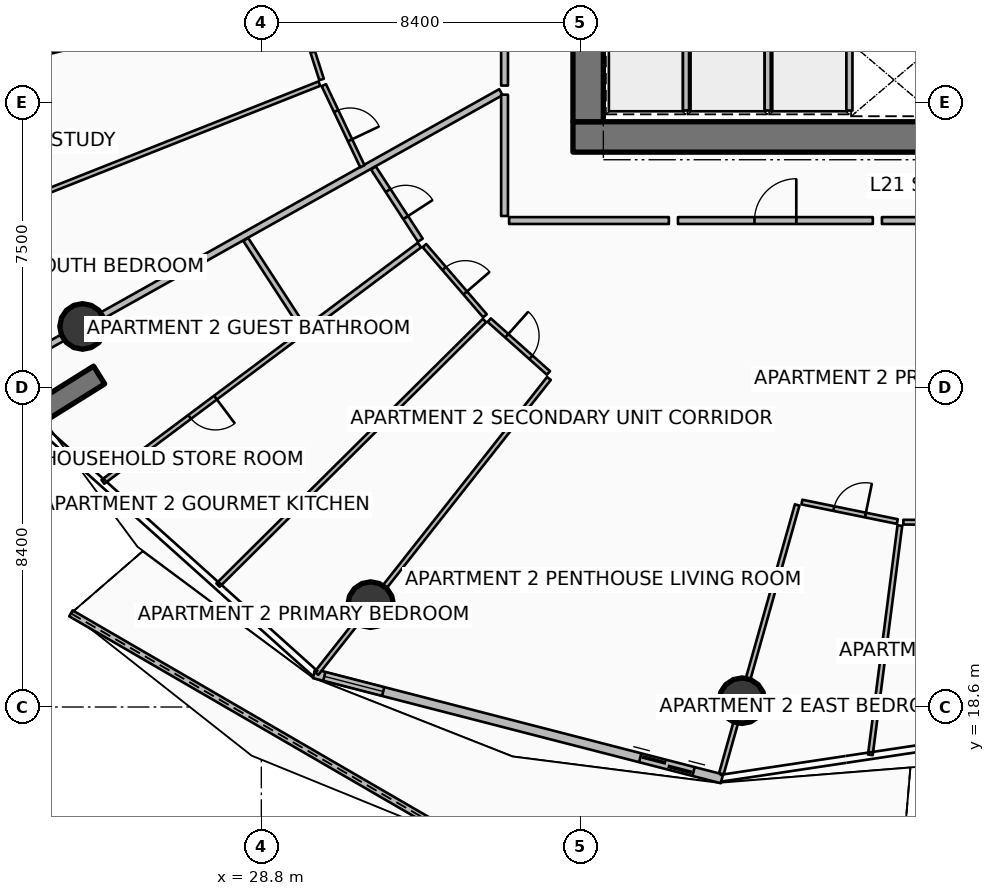
"""IFC4 building model, lengths in metres.
Left out: names, types, materials, properties, quantities, classifications, styles, units other than length and angle.
Written with IfcOpenShell. Run it as: python <this file> out.ifc"""

import sys

from ifc_helpers import new_model, si_unit, direction, frame, frame_2d, origin, origin_2d, place, context, subcontext, project, spatial, polyline, rectangle, circle, outline, extrude, element, fill, save


model = new_model("IFC4")
c1 = context("Model", 3, precision=1e-05, world=origin(), true_north=direction((0.0, 1.0)))
c2 = subcontext(c1, "Body", "Model", "MODEL_VIEW")
j1 = project(units=[si_unit("LENGTHUNIT", "METRE"), si_unit("PLANEANGLEUNIT", "RADIAN")], contexts=[c1])
p1 = place(None, origin())
s1 = spatial("IfcSite", under=j1, at=p1, CompositionType="ELEMENT")
p2 = place(p1, origin())
s2 = spatial("IfcBuilding", under=s1, at=p2, CompositionType="ELEMENT")
p3 = place(p2, frame((0.0, 0.0, 86.4)))
s3 = spatial("IfcBuildingStorey", under=s2, at=p3, CompositionType="ELEMENT", Elevation=86.4)
p4 = place(p3, frame((37.0, 33.6, 0.0), z_axis=(0.0, 0.0, 1.0), x_axis=(1.0, 0.0, 0.0)))
e1 = element("IfcWall", 1, at=p4, inside=s3, PredefinedType="SHEAR", context=c2, shape_type="SweptSolid", body=[
    extrude(rectangle(XDim=9.9, YDim=0.8, at=frame_2d((4.95, 0.0))), origin(), (0.0, 0.0, 1.0), 3.75),
])
p5 = place(p3, frame((37.4, 34.0, 0.0), z_axis=(0.0, 0.0, 1.0), x_axis=(0.0, 1.0, 0.0)))
e2 = element("IfcWall", 2, at=p5, inside=s3, PredefinedType="SHEAR", context=c2, shape_type="SweptSolid", body=[
    extrude(rectangle(XDim=16.0, YDim=0.8, at=frame_2d((8.0, 0.0))), origin(), (0.0, 0.0, 1.0), 3.75),
])
p6 = place(p3, frame((24.531, 27.335, 0.0), z_axis=(0.0, 0.0, 1.0), x_axis=(-0.848053161125, -0.529911158502, 0.0)))
e3 = element("IfcWall", 3, at=p6, inside=s3, PredefinedType="SOLIDWALL", context=c2, shape_type="SweptSolid", body=[
    extrude(rectangle(XDim=3.5, YDim=0.55, at=frame_2d((1.75, 0.0))), origin(), (0.0, 0.0, 1.0), 3.75),
])
for number, where, z_axis, x_axis in (
    (4, (24.097, 28.614, 0.0), (0.0, 0.0, 1.0), (1.0, 0.0, 0.0)),
    (5, (31.677, 21.294, 0.0), (0.0, 0.0, 1.0), (1.0, 0.0, 0.0)),
    (6, (41.447, 18.766, 0.0), (0.0, 0.0, 1.0), (1.0, 0.0, 0.0)),
):
    element("IfcColumn", number, at=place(p3, frame(where, z_axis=z_axis, x_axis=x_axis)), inside=s3, PredefinedType="COLUMN", context=c2, shape_type="SweptSolid", body=[
        extrude(circle(Radius=0.6, at=origin_2d()), origin(), (0.0, 0.0, 1.0), 3.5),
    ])
p7 = place(p3, frame((23.789, 21.065, 0.0), z_axis=(0.0, 0.0, 1.0), x_axis=(0.864945812977, -0.501865261413, 0.0)))
e7 = element("IfcWall", 7, at=p7, inside=s3, PredefinedType="PARAPET", context=c2, shape_type="SweptSolid", body=[
    extrude(outline(polyline([(0.0, 0.0), (11.966, 0.0), (11.966, 1.832), (5.983, 1.853), (0.0, 1.756), (0.0, 0.0)])), frame((0.0, 0.09, 0.0), z_axis=(0.0, -1.0, 0.0), x_axis=(1.0, 0.0, 0.0)), (0.0, 0.0, 1.0), 0.18),
])
p8 = place(p3, frame((30.186, 19.477, 0.0), z_axis=(0.0, 0.0, 1.0), x_axis=(0.968356180858, -0.249572248045, 0.0)))
e8 = element("IfcWall", 8, at=p8, inside=s3, PredefinedType="SOLIDWALL", context=c2, shape_type="SweptSolid", body=[
    extrude(rectangle(XDim=11.084, YDim=0.24, at=frame_2d((5.542, 0.0))), origin(), (0.0, 0.0, 1.0), 2.45),
])
p9 = place(p8, frame((8.865, 0.0, 0.0)))
e9 = element("IfcOpeningElement", 9, at=p9, cuts=e8, PredefinedType="OPENING", context=c2, shape_type="SweptSolid", body=[
    extrude(rectangle(XDim=1.45, YDim=2.15, at=frame_2d((0.725, 1.075))), frame((0.0, 0.13, 0.0), z_axis=(0.0, -1.0, 0.0), x_axis=(1.0, 0.0, 0.0)), (0.0, 0.0, 1.0), 0.26),
])
p10 = place(p8, frame((0.28, 0.0, 0.65)))
e10 = element("IfcOpeningElement", 10, at=p10, cuts=e8, PredefinedType="OPENING", context=c2, shape_type="SweptSolid", body=[
    extrude(rectangle(XDim=1.6, YDim=1.5, at=frame_2d((0.8, 0.75))), frame((0.0, 0.13, 0.0), z_axis=(0.0, -1.0, 0.0), x_axis=(1.0, 0.0, 0.0)), (0.0, 0.0, 1.0), 0.26),
])
for number, where, z_axis, x_axis in (
    (11, (39.975, 34.295, 0.0), (0.0, 0.0, 1.0), (0.0, 1.0, 0.0)),
    (12, (42.125, 34.295, 0.0), (0.0, 0.0, 1.0), (0.0, 1.0, 0.0)),
    (13, (44.275, 34.295, 0.0), (0.0, 0.0, 1.0), (0.0, 1.0, 0.0)),
):
    element("IfcWall", number, at=place(p3, frame(where, z_axis=z_axis, x_axis=x_axis)), inside=s3, PredefinedType="PARTITIONING", context=c2, shape_type="SweptSolid", body=[
        extrude(rectangle(XDim=1.61, YDim=0.16, at=frame_2d((0.805, 0.0))), origin(), (0.0, 0.0, 1.0), 3.5),
    ])
p11 = place(p3, frame((35.104, 34.778, 0.0), z_axis=(0.0, 0.0, 1.0), x_axis=(-0.872490437896, -0.488631185845, 0.0)))
e14 = element("IfcWall", 14, at=p11, inside=s3, PredefinedType="PARTITIONING", context=c2, shape_type="SweptSolid", body=[
    extrude(rectangle(XDim=14.699, YDim=0.18, at=frame_2d((7.35, 0.0))), origin(), (0.0, 0.0, 1.0), 2.94),
])
p12 = place(p3, frame((35.2, 40.365, 0.0), z_axis=(0.0, 0.0, 1.0), x_axis=(0.0, -1.0, 0.0)))
e15 = element("IfcWall", 15, at=p12, inside=s3, PredefinedType="PARTITIONING", context=c2, shape_type="SweptSolid", body=[
    extrude(rectangle(XDim=5.413, YDim=0.18, at=frame_2d((2.707, 0.0))), origin(), (0.0, 0.0, 1.0), 2.94),
])
p13 = place(p3, frame((29.552, 37.417, 0.0), z_axis=(0.0, 0.0, 1.0), x_axis=(-0.970504192203, -0.241084244437, 0.0)))
e16 = element("IfcWall", 16, at=p13, inside=s3, PredefinedType="PARTITIONING", context=c2, shape_type="SweptSolid", body=[
    extrude(rectangle(XDim=9.976, YDim=0.125, at=frame_2d((4.988, 0.0))), origin(), (0.0, 0.0, 1.0), 2.94),
])
p14 = place(p3, frame((30.326, 35.002, 0.0), z_axis=(0.0, 0.0, 1.0), x_axis=(-0.929777602375, -0.368121732748, 0.0)))
e17 = element("IfcWall", 17, at=p14, inside=s3, PredefinedType="PARTITIONING", context=c2, shape_type="SweptSolid", body=[
    extrude(rectangle(XDim=9.961, YDim=0.125, at=frame_2d((4.98, 0.0))), origin(), (0.0, 0.0, 1.0), 2.94),
])
p15 = place(p3, frame((29.663, 37.363, 0.0), z_axis=(0.0, 0.0, 1.0), x_axis=(0.305393983716, -0.952226083822, 0.0)))
e18 = element("IfcWall", 18, at=p15, inside=s3, PredefinedType="PARTITIONING", context=c2, shape_type="SweptSolid", body=[
    extrude(rectangle(XDim=2.364, YDim=0.125, at=frame_2d((1.182, 0.0))), origin(), (0.0, 0.0, 1.0), 2.94),
])
p16 = place(p15, frame((0.757, 0.0, 0.0)))
e19 = element("IfcOpeningElement", 19, at=p16, cuts=e18, PredefinedType="OPENING", context=c2, shape_type="SweptSolid", body=[
    extrude(rectangle(XDim=0.85, YDim=2.06, at=frame_2d((0.425, 1.03))), frame((0.0, 0.073, 0.0), z_axis=(0.0, -1.0, 0.0), x_axis=(1.0, 0.0, 0.0)), (0.0, 0.0, 1.0), 0.145),
])
p17 = place(p3, frame((30.444, 34.963, 0.0), z_axis=(0.0, 0.0, 1.0), x_axis=(0.429404357622, -0.903112339443, 0.0)))
e20 = element("IfcWall", 20, at=p17, inside=s3, PredefinedType="PARTITIONING", context=c2, shape_type="SweptSolid", body=[
    extrude(rectangle(XDim=2.364, YDim=0.125, at=frame_2d((1.182, 0.0))), origin(), (0.0, 0.0, 1.0), 2.94),
])
p18 = place(p17, frame((0.757, 0.0, 0.0)))
e21 = element("IfcOpeningElement", 21, at=p18, cuts=e20, PredefinedType="OPENING", context=c2, shape_type="SweptSolid", body=[
    extrude(rectangle(XDim=0.85, YDim=2.06, at=frame_2d((0.425, 1.03))), frame((0.0, 0.073, 0.0), z_axis=(0.0, -1.0, 0.0), x_axis=(1.0, 0.0, 0.0)), (0.0, 0.0, 1.0), 0.145),
])
p19 = place(p3, frame((39.764, 31.4, 0.0), z_axis=(0.0, 0.0, 1.0), x_axis=(1.0, 0.0, 0.0)))
e22 = element("IfcWall", 22, at=p19, inside=s3, PredefinedType="PARTITIONING", context=c2, shape_type="SweptSolid", body=[
    extrude(rectangle(XDim=5.127, YDim=0.18, at=frame_2d((2.563, 0.0))), origin(), (0.0, 0.0, 1.0), 2.94),
])
p20 = place(p19, frame((2.013, 0.0, 0.0)))
e23 = element("IfcOpeningElement", 23, at=p20, cuts=e22, PredefinedType="OPENING", context=c2, shape_type="SweptSolid", body=[
    extrude(rectangle(XDim=1.1, YDim=2.1, at=frame_2d((0.55, 1.05))), frame((0.0, 0.1, 0.0), z_axis=(0.0, -1.0, 0.0), x_axis=(1.0, 0.0, 0.0)), (0.0, 0.0, 1.0), 0.2),
])
p21 = place(p3, frame((35.2, 34.712, 0.0), z_axis=(0.0, 0.0, 1.0), x_axis=(0.0, -1.0, 0.0)))
e24 = element("IfcWall", 24, at=p21, inside=s3, PredefinedType="PARTITIONING", context=c2, shape_type="SweptSolid", body=[
    extrude(rectangle(XDim=3.192, YDim=0.18, at=frame_2d((1.596, 0.0))), origin(), (0.0, 0.0, 1.0), 2.94),
])
p22 = place(p3, frame((35.32, 31.4, 0.0), z_axis=(0.0, 0.0, 1.0), x_axis=(1.0, 0.0, 0.0)))
e25 = element("IfcWall", 25, at=p22, inside=s3, PredefinedType="PARTITIONING", context=c2, shape_type="SweptSolid", body=[
    extrude(rectangle(XDim=4.204, YDim=0.18, at=frame_2d((2.102, 0.0))), origin(), (0.0, 0.0, 1.0), 2.94),
])
p23 = place(p3, frame((36.368, 27.245, 0.0), z_axis=(0.0, 0.0, 1.0), x_axis=(-0.619096231027, -0.785315132115, 0.0)))
e26 = element("IfcWall", 26, at=p23, inside=s3, PredefinedType="PARTITIONING", context=c2, shape_type="SweptSolid", body=[
    extrude(rectangle(XDim=9.882, YDim=0.125, at=frame_2d((4.941, 0.0))), origin(), (0.0, 0.0, 1.0), 2.94),
])
p24 = place(p3, frame((31.748, 32.784, 0.0), z_axis=(0.0, 0.0, 1.0), x_axis=(0.544920213423, -0.838487901524, 0.0)))
e27 = element("IfcWall", 27, at=p24, inside=s3, PredefinedType="PARTITIONING", context=c2, shape_type="SweptSolid", body=[
    extrude(rectangle(XDim=2.267, YDim=0.15, at=frame_2d((1.134, 0.0))), origin(), (0.0, 0.0, 1.0), 2.94),
])
p25 = place(p24, frame((0.708, 0.0, 0.0)))
e28 = element("IfcOpeningElement", 28, at=p25, cuts=e27, PredefinedType="OPENING", context=c2, shape_type="SweptSolid", body=[
    extrude(rectangle(XDim=0.85, YDim=2.06, at=frame_2d((0.425, 1.03))), frame((0.0, 0.085, 0.0), z_axis=(0.0, -1.0, 0.0), x_axis=(1.0, 0.0, 0.0)), (0.0, 0.0, 1.0), 0.17),
])
p26 = place(p3, frame((28.389, 30.903, 0.0), z_axis=(0.0, 0.0, 1.0), x_axis=(0.544849096032, -0.838534115318, 0.0)))
e29 = element("IfcWall", 29, at=p26, inside=s3, PredefinedType="PARTITIONING", context=c2, shape_type="SweptSolid", body=[
    extrude(rectangle(XDim=2.773, YDim=0.15, at=frame_2d((1.387, 0.0))), origin(), (0.0, 0.0, 1.0), 2.94),
])
p27 = place(p3, frame((32.961, 30.754, 0.0), z_axis=(0.0, 0.0, 1.0), x_axis=(-0.800889069655, -0.598812740435, 0.0)))
e30 = element("IfcWall", 30, at=p27, inside=s3, PredefinedType="PARTITIONING", context=c2, shape_type="SweptSolid", body=[
    extrude(rectangle(XDim=3.72, YDim=0.15, at=frame_2d((1.86, 0.0))), origin(), (0.0, 0.0, 1.0), 2.94),
])
p28 = place(p3, frame((29.877, 28.448, 0.0), z_axis=(0.0, 0.0, 1.0), x_axis=(-0.800862229892, -0.598848635911, 0.0)))
e31 = element("IfcWall", 31, at=p28, inside=s3, PredefinedType="PARTITIONING", context=c2, shape_type="SweptSolid", body=[
    extrude(rectangle(XDim=6.552, YDim=0.125, at=frame_2d((3.276, 0.0))), origin(), (0.0, 0.0, 1.0), 2.94),
])
p29 = place(p28, frame((2.851, 0.0, 0.0)))
e32 = element("IfcOpeningElement", 32, at=p29, cuts=e31, PredefinedType="OPENING", context=c2, shape_type="SweptSolid", body=[
    extrude(rectangle(XDim=0.85, YDim=2.06, at=frame_2d((0.425, 1.03))), frame((0.0, 0.073, 0.0), z_axis=(0.0, -1.0, 0.0), x_axis=(1.0, 0.0, 0.0)), (0.0, 0.0, 1.0), 0.145),
])
p30 = place(p3, frame((34.673, 28.769, 0.0), z_axis=(0.0, 0.0, 1.0), x_axis=(-0.709671596246, -0.70453262911, 0.0)))
e33 = element("IfcWall", 33, at=p30, inside=s3, PredefinedType="PARTITIONING", context=c2, shape_type="SweptSolid", body=[
    extrude(rectangle(XDim=9.882, YDim=0.125, at=frame_2d((4.941, 0.0))), origin(), (0.0, 0.0, 1.0), 2.94),
])
p31 = place(p3, frame((33.092, 30.74, 0.0), z_axis=(0.0, 0.0, 1.0), x_axis=(0.653244508484, -0.757147021479, 0.0)))
e34 = element("IfcWall", 34, at=p31, inside=s3, PredefinedType="PARTITIONING", context=c2, shape_type="SweptSolid", body=[
    extrude(rectangle(XDim=2.439, YDim=0.125, at=frame_2d((1.219, 0.0))), origin(), (0.0, 0.0, 1.0), 2.94),
])
p32 = place(p31, frame((0.794, 0.0, 0.0)))
e35 = element("IfcOpeningElement", 35, at=p32, cuts=e34, PredefinedType="OPENING", context=c2, shape_type="SweptSolid", body=[
    extrude(rectangle(XDim=0.85, YDim=2.06, at=frame_2d((0.425, 1.03))), frame((0.0, 0.073, 0.0), z_axis=(0.0, -1.0, 0.0), x_axis=(1.0, 0.0, 0.0)), (0.0, 0.0, 1.0), 0.145),
])
p33 = place(p3, frame((34.797, 28.78, 0.0), z_axis=(0.0, 0.0, 1.0), x_axis=(0.74635037564, -0.665553241132, 0.0)))
e36 = element("IfcWall", 36, at=p33, inside=s3, PredefinedType="PARTITIONING", context=c2, shape_type="SweptSolid", body=[
    extrude(rectangle(XDim=2.088, YDim=0.125, at=frame_2d((1.044, 0.0))), origin(), (0.0, 0.0, 1.0), 2.94),
])
p34 = place(p33, frame((0.619, 0.0, 0.0)))
e37 = element("IfcOpeningElement", 37, at=p34, cuts=e36, PredefinedType="OPENING", context=c2, shape_type="SweptSolid", body=[
    extrude(rectangle(XDim=0.85, YDim=2.06, at=frame_2d((0.425, 1.03))), frame((0.0, 0.073, 0.0), z_axis=(0.0, -1.0, 0.0), x_axis=(1.0, 0.0, 0.0)), (0.0, 0.0, 1.0), 0.145),
])
p35 = place(p3, frame((45.131, 31.4, 0.0), z_axis=(0.0, 0.0, 1.0), x_axis=(1.0, 0.0, 0.0)))
e38 = element("IfcWall", 38, at=p35, inside=s3, PredefinedType="PARTITIONING", context=c2, shape_type="SweptSolid", body=[
    extrude(rectangle(XDim=4.004, YDim=0.18, at=frame_2d((2.002, 0.0))), origin(), (0.0, 0.0, 1.0), 2.94),
])
p36 = place(p3, frame((42.9, 23.917, 0.0), z_axis=(0.0, 0.0, 1.0), x_axis=(-0.27145069635, -0.962452346587, 0.0)))
e39 = element("IfcWall", 39, at=p36, inside=s3, PredefinedType="PARTITIONING", context=c2, shape_type="SweptSolid", body=[
    extrude(rectangle(XDim=7.349, YDim=0.125, at=frame_2d((3.674, 0.0))), origin(), (0.0, 0.0, 1.0), 2.94),
])
p37 = place(p3, frame((45.603, 23.375, 0.0), z_axis=(0.0, 0.0, 1.0), x_axis=(-0.127689849516, -0.991814147071, 0.0)))
e40 = element("IfcWall", 40, at=p37, inside=s3, PredefinedType="PARTITIONING", context=c2, shape_type="SweptSolid", body=[
    extrude(rectangle(XDim=6.082, YDim=0.125, at=frame_2d((3.041, 0.0))), origin(), (0.0, 0.0, 1.0), 2.94),
])
p38 = place(p3, frame((43.025, 23.993, 0.0), z_axis=(0.0, 0.0, 1.0), x_axis=(0.97978119615, -0.200072006215, 0.0)))
e41 = element("IfcWall", 41, at=p38, inside=s3, PredefinedType="PARTITIONING", context=c2, shape_type="SweptSolid", body=[
    extrude(rectangle(XDim=2.562, YDim=0.125, at=frame_2d((1.281, 0.0))), origin(), (0.0, 0.0, 1.0), 2.94),
])
p39 = place(p38, frame((0.856, 0.0, 0.0)))
e42 = element("IfcOpeningElement", 42, at=p39, cuts=e41, PredefinedType="OPENING", context=c2, shape_type="SweptSolid", body=[
    extrude(rectangle(XDim=0.85, YDim=2.06, at=frame_2d((0.425, 1.03))), frame((0.0, 0.073, 0.0), z_axis=(0.0, -1.0, 0.0), x_axis=(1.0, 0.0, 0.0)), (0.0, 0.0, 1.0), 0.145),
])
p40 = place(p3, frame((45.694, 23.463, 0.0), z_axis=(0.0, 0.0, 1.0), x_axis=(0.999986986287, -0.005101691496, 0.0)))
e43 = element("IfcWall", 43, at=p40, inside=s3, PredefinedType="PARTITIONING", context=c2, shape_type="SweptSolid", body=[
    extrude(rectangle(XDim=4.403, YDim=0.125, at=frame_2d((2.201, 0.0))), origin(), (0.0, 0.0, 1.0), 2.94),
])
p41 = place(p40, frame((1.751, 0.0, 0.0)))
e44 = element("IfcOpeningElement", 44, at=p41, cuts=e43, PredefinedType="OPENING", context=c2, shape_type="SweptSolid", body=[
    extrude(rectangle(XDim=0.9, YDim=2.08, at=frame_2d((0.45, 1.04))), frame((0.0, 0.073, 0.0), z_axis=(0.0, -1.0, 0.0), x_axis=(1.0, 0.0, 0.0)), (0.0, 0.0, 1.0), 0.145),
])
p42 = place(p9, origin())
e45 = element("IfcDoor", 45, at=p42, inside=s3, OperationType="DOUBLE_DOOR_SLIDING", PredefinedType="DOOR", context=c2, shape_type="SweptSolid", body=[
    extrude(rectangle(XDim=1.45, YDim=2.15, at=frame_2d((0.725, 1.075))), frame((0.0, 0.025, 0.0), z_axis=(0.0, -1.0, 0.0), x_axis=(1.0, 0.0, 0.0)), (0.0, 0.0, 1.0), 0.05),
])
fill(e9, e45)
p43 = place(p10, origin())
e46 = element("IfcWindow", 46, at=p43, inside=s3, PartitioningType="SINGLE_PANEL", PredefinedType="WINDOW", context=c2, shape_type="SweptSolid", body=[
    extrude(rectangle(XDim=1.6, YDim=1.5, at=frame_2d((0.8, 0.75))), frame((0.0, 0.03, 0.0), z_axis=(0.0, -1.0, 0.0), x_axis=(1.0, 0.0, 0.0)), (0.0, 0.0, 1.0), 0.06),
])
fill(e10, e46)
p44 = place(p16, origin())
e47 = element("IfcDoor", 47, at=p44, inside=s3, OperationType="SINGLE_SWING_LEFT", PredefinedType="DOOR", context=c2, shape_type="SweptSolid", body=[
    extrude(rectangle(XDim=0.85, YDim=2.06, at=frame_2d((0.425, 1.03))), frame((0.0, 0.025, 0.0), z_axis=(0.0, -1.0, 0.0), x_axis=(1.0, 0.0, 0.0)), (0.0, 0.0, 1.0), 0.05),
])
fill(e19, e47)
p45 = place(p18, origin())
e48 = element("IfcDoor", 48, at=p45, inside=s3, OperationType="SINGLE_SWING_RIGHT", PredefinedType="DOOR", context=c2, shape_type="SweptSolid", body=[
    extrude(rectangle(XDim=0.85, YDim=2.06, at=frame_2d((0.425, 1.03))), frame((0.0, 0.025, 0.0), z_axis=(0.0, -1.0, 0.0), x_axis=(1.0, 0.0, 0.0)), (0.0, 0.0, 1.0), 0.05),
])
fill(e21, e48)
p46 = place(p20, origin())
e49 = element("IfcDoor", 49, at=p46, inside=s3, OperationType="SINGLE_SWING_RIGHT", PredefinedType="DOOR", context=c2, shape_type="SweptSolid", body=[
    extrude(rectangle(XDim=1.1, YDim=2.1, at=frame_2d((0.55, 1.05))), frame((0.0, 0.025, 0.0), z_axis=(0.0, -1.0, 0.0), x_axis=(1.0, 0.0, 0.0)), (0.0, 0.0, 1.0), 0.05),
])
fill(e23, e49)
p47 = place(p25, origin())
e50 = element("IfcDoor", 50, at=p47, inside=s3, OperationType="SINGLE_SWING_RIGHT", PredefinedType="DOOR", context=c2, shape_type="SweptSolid", body=[
    extrude(rectangle(XDim=0.85, YDim=2.06, at=frame_2d((0.425, 1.03))), frame((0.0, 0.025, 0.0), z_axis=(0.0, -1.0, 0.0), x_axis=(1.0, 0.0, 0.0)), (0.0, 0.0, 1.0), 0.05),
])
fill(e28, e50)
p48 = place(p29, origin())
e51 = element("IfcDoor", 51, at=p48, inside=s3, OperationType="SINGLE_SWING_LEFT", PredefinedType="DOOR", context=c2, shape_type="SweptSolid", body=[
    extrude(rectangle(XDim=0.85, YDim=2.06, at=frame_2d((0.425, 1.03))), frame((0.0, 0.025, 0.0), z_axis=(0.0, -1.0, 0.0), x_axis=(1.0, 0.0, 0.0)), (0.0, 0.0, 1.0), 0.05),
])
fill(e32, e51)
p49 = place(p32, origin())
e52 = element("IfcDoor", 52, at=p49, inside=s3, OperationType="SINGLE_SWING_RIGHT", PredefinedType="DOOR", context=c2, shape_type="SweptSolid", body=[
    extrude(rectangle(XDim=0.85, YDim=2.06, at=frame_2d((0.425, 1.03))), frame((0.0, 0.025, 0.0), z_axis=(0.0, -1.0, 0.0), x_axis=(1.0, 0.0, 0.0)), (0.0, 0.0, 1.0), 0.05),
])
fill(e35, e52)
p50 = place(p34, origin())
e53 = element("IfcDoor", 53, at=p50, inside=s3, OperationType="SINGLE_SWING_LEFT", PredefinedType="DOOR", context=c2, shape_type="SweptSolid", body=[
    extrude(rectangle(XDim=0.85, YDim=2.06, at=frame_2d((0.425, 1.03))), frame((0.0, 0.025, 0.0), z_axis=(0.0, -1.0, 0.0), x_axis=(1.0, 0.0, 0.0)), (0.0, 0.0, 1.0), 0.05),
])
fill(e37, e53)
p51 = place(p39, origin())
e54 = element("IfcDoor", 54, at=p51, inside=s3, OperationType="SINGLE_SWING_RIGHT", PredefinedType="DOOR", context=c2, shape_type="SweptSolid", body=[
    extrude(rectangle(XDim=0.85, YDim=2.06, at=frame_2d((0.425, 1.03))), frame((0.0, 0.025, 0.0), z_axis=(0.0, -1.0, 0.0), x_axis=(1.0, 0.0, 0.0)), (0.0, 0.0, 1.0), 0.05),
])
fill(e42, e54)
save(model, sys.argv[1])
